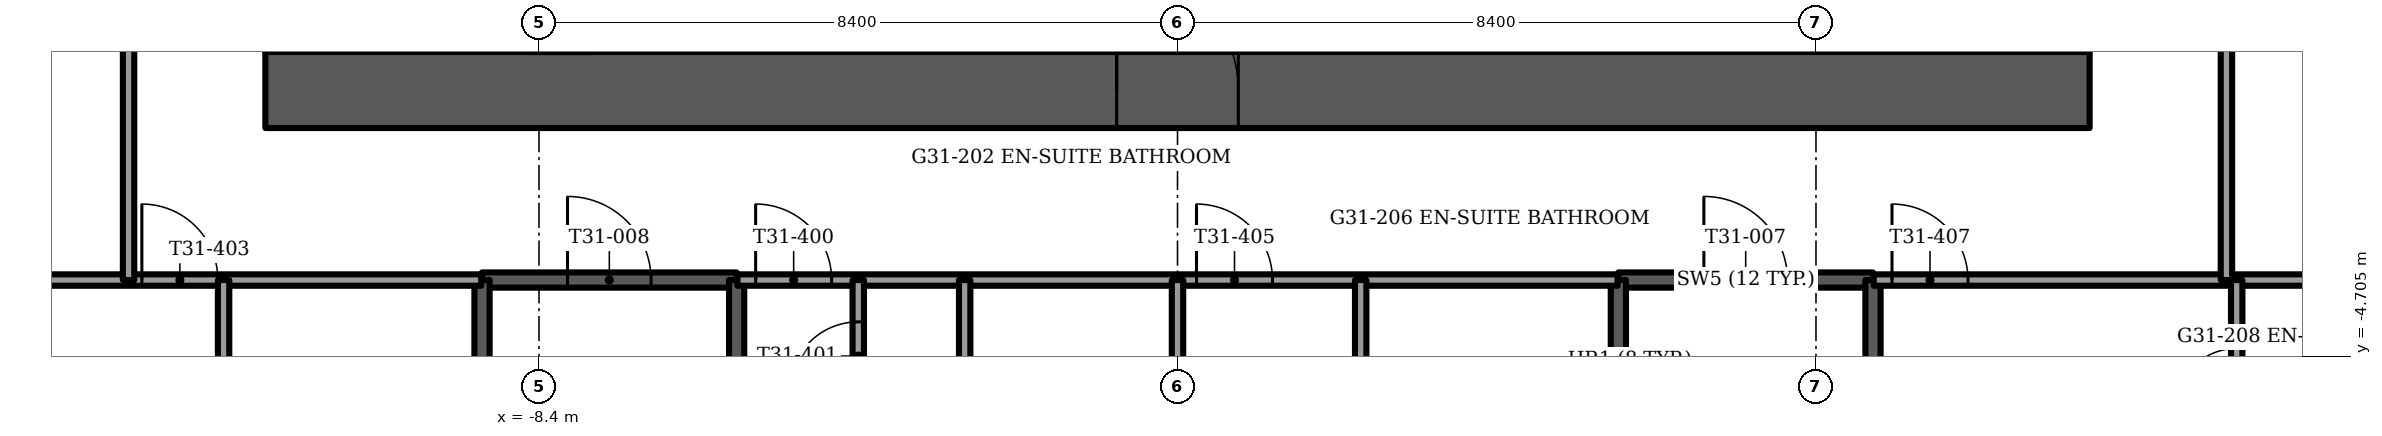
"""IFC4 building model, lengths in metres.
Left out: names, types, materials, properties, quantities, classifications, styles, units other than length and angle.
Written with IfcOpenShell. Run it as: python <this file> out.ifc"""

import sys

from ifc_helpers import new_model, si_unit, direction, frame, frame_2d, origin, place, context, subcontext, project, spatial, rectangle, extrude, element, fill, save


model = new_model("IFC4")
c1 = context("Model", 3, precision=1e-05, world=origin(), true_north=direction((0.0, 1.0)))
c2 = subcontext(c1, "Body", "Model", "MODEL_VIEW")
j1 = project(units=[si_unit("LENGTHUNIT", "METRE"), si_unit("PLANEANGLEUNIT", "RADIAN")], contexts=[c1])
p1 = place(None, origin())
s1 = spatial("IfcSite", under=j1, at=p1, CompositionType="ELEMENT")
p2 = place(p1, origin())
s2 = spatial("IfcBuilding", under=s1, at=p2, CompositionType="ELEMENT")
p3 = place(p2, frame((0.0, 0.0, 127.25)))
s3 = spatial("IfcBuildingStorey", under=s2, at=p3, CompositionType="ELEMENT", Elevation=127.25)
p4 = place(p3, frame((-12.0, -1.2, -0.3), z_axis=(0.0, 0.0, 1.0), x_axis=(1.0, 0.0, 0.0)))
e1 = element("IfcWall", 1, at=p4, inside=s3, PredefinedType="SHEAR", context=c2, shape_type="SweptSolid", body=[
    extrude(rectangle(XDim=24.0, YDim=1.0, at=frame_2d((12.0, 0.0))), origin(), (0.0, 0.0, 1.0), 3.75),
])
p5 = place(p4, frame((11.2, 0.0, 0.0)))
e2 = element("IfcOpeningElement", 2, at=p5, cuts=e1, PredefinedType="OPENING", context=c2, shape_type="SweptSolid", body=[
    extrude(rectangle(XDim=1.6, YDim=2.1, at=frame_2d((0.8, 1.05))), frame((0.0, 0.5, 0.0), z_axis=(0.0, -1.0, 0.0), x_axis=(1.0, 0.0, 0.0)), (0.0, 0.0, 1.0), 1.0),
])
p6 = place(p3, frame((-18.71, -1.444, 0.0), z_axis=(0.0, 0.0, 1.0), x_axis=(0.500010582961, -0.866019293623, 0.0)))
e3 = element("IfcWall", 3, at=p6, inside=s3, PredefinedType="SOLIDWALL", context=c2, shape_type="SweptSolid", body=[
    extrude(rectangle(XDim=16.21, YDim=0.15, at=frame_2d((8.105, 0.0))), origin(), (0.0, 0.0, 1.0), 3.45),
])
p7 = place(p6, frame((2.93, 0.0, 0.15)))
e4 = element("IfcOpeningElement", 4, at=p7, cuts=e3, PredefinedType="OPENING", context=c2, shape_type="SweptSolid", body=[
    extrude(rectangle(XDim=0.9, YDim=2.85, at=frame_2d((0.45, 1.425))), frame((0.0, 0.075, 0.0), z_axis=(0.0, -1.0, 0.0), x_axis=(1.0, 0.0, 0.0)), (0.0, 0.0, 1.0), 0.15),
])
p8 = place(p6, frame((4.205, 0.0, 0.0)))
e5 = element("IfcOpeningElement", 5, at=p8, cuts=e3, PredefinedType="OPENING", context=c2, shape_type="SweptSolid", body=[
    extrude(rectangle(XDim=1.5, YDim=2.4, at=frame_2d((0.75, 1.2))), frame((0.0, 0.075, 0.0), z_axis=(0.0, -1.0, 0.0), x_axis=(1.0, 0.0, 0.0)), (0.0, 0.0, 1.0), 0.15),
])
p9 = place(p6, frame((6.305, 0.0, 0.15)))
e6 = element("IfcOpeningElement", 6, at=p9, cuts=e3, PredefinedType="OPENING", context=c2, shape_type="SweptSolid", body=[
    extrude(rectangle(XDim=1.7, YDim=2.85, at=frame_2d((0.85, 1.425))), frame((0.0, 0.075, 0.0), z_axis=(0.0, -1.0, 0.0), x_axis=(1.0, 0.0, 0.0)), (0.0, 0.0, 1.0), 0.15),
])
p10 = place(p6, frame((8.405, 0.0, 0.0)))
e7 = element("IfcOpeningElement", 7, at=p10, cuts=e3, PredefinedType="OPENING", context=c2, shape_type="SweptSolid", body=[
    extrude(rectangle(XDim=1.5, YDim=2.4, at=frame_2d((0.75, 1.2))), frame((0.0, 0.075, 0.0), z_axis=(0.0, -1.0, 0.0), x_axis=(1.0, 0.0, 0.0)), (0.0, 0.0, 1.0), 0.15),
])
p11 = place(p6, frame((10.505, 0.0, 0.15)))
e8 = element("IfcOpeningElement", 8, at=p11, cuts=e3, PredefinedType="OPENING", context=c2, shape_type="SweptSolid", body=[
    extrude(rectangle(XDim=1.7, YDim=2.85, at=frame_2d((0.85, 1.425))), frame((0.0, 0.075, 0.0), z_axis=(0.0, -1.0, 0.0), x_axis=(1.0, 0.0, 0.0)), (0.0, 0.0, 1.0), 0.15),
])
p12 = place(p6, frame((12.605, 0.0, 0.0)))
e9 = element("IfcOpeningElement", 9, at=p12, cuts=e3, PredefinedType="OPENING", context=c2, shape_type="SweptSolid", body=[
    extrude(rectangle(XDim=1.5, YDim=2.4, at=frame_2d((0.75, 1.2))), frame((0.0, 0.075, 0.0), z_axis=(0.0, -1.0, 0.0), x_axis=(1.0, 0.0, 0.0)), (0.0, 0.0, 1.0), 0.15),
])
p13 = place(p6, frame((0.402, 0.0, 0.15)))
e10 = element("IfcOpeningElement", 10, at=p13, cuts=e3, PredefinedType="OPENING", context=c2, shape_type="SweptSolid", body=[
    extrude(rectangle(XDim=0.9, YDim=2.73, at=frame_2d((0.45, 1.365))), frame((0.0, 0.075, 0.0), z_axis=(0.0, -1.0, 0.0), x_axis=(1.0, 0.0, 0.0)), (0.0, 0.0, 1.0), 0.15),
])
p14 = place(p6, frame((14.907, 0.0, 0.15)))
e11 = element("IfcOpeningElement", 11, at=p14, cuts=e3, PredefinedType="OPENING", context=c2, shape_type="SweptSolid", body=[
    extrude(rectangle(XDim=0.9, YDim=2.73, at=frame_2d((0.45, 1.365))), frame((0.0, 0.075, 0.0), z_axis=(0.0, -1.0, 0.0), x_axis=(1.0, 0.0, 0.0)), (0.0, 0.0, 1.0), 0.15),
])
p15 = place(p3, frame((10.605, -15.481, 0.0), z_axis=(0.0, 0.0, 1.0), x_axis=(0.500010582961, 0.866019293623, 0.0)))
e12 = element("IfcWall", 12, at=p15, inside=s3, PredefinedType="SOLIDWALL", context=c2, shape_type="SweptSolid", body=[
    extrude(rectangle(XDim=16.21, YDim=0.15, at=frame_2d((8.105, 0.0))), origin(), (0.0, 0.0, 1.0), 3.45),
])
p16 = place(p15, frame((2.105, 0.0, 0.15)))
e13 = element("IfcOpeningElement", 13, at=p16, cuts=e12, PredefinedType="OPENING", context=c2, shape_type="SweptSolid", body=[
    extrude(rectangle(XDim=1.7, YDim=2.85, at=frame_2d((0.85, 1.425))), frame((0.0, 0.075, 0.0), z_axis=(0.0, -1.0, 0.0), x_axis=(1.0, 0.0, 0.0)), (0.0, 0.0, 1.0), 0.15),
])
p17 = place(p15, frame((4.205, 0.0, 0.0)))
e14 = element("IfcOpeningElement", 14, at=p17, cuts=e12, PredefinedType="OPENING", context=c2, shape_type="SweptSolid", body=[
    extrude(rectangle(XDim=1.5, YDim=2.4, at=frame_2d((0.75, 1.2))), frame((0.0, 0.075, 0.0), z_axis=(0.0, -1.0, 0.0), x_axis=(1.0, 0.0, 0.0)), (0.0, 0.0, 1.0), 0.15),
])
p18 = place(p15, frame((6.305, 0.0, 0.15)))
e15 = element("IfcOpeningElement", 15, at=p18, cuts=e12, PredefinedType="OPENING", context=c2, shape_type="SweptSolid", body=[
    extrude(rectangle(XDim=1.7, YDim=2.85, at=frame_2d((0.85, 1.425))), frame((0.0, 0.075, 0.0), z_axis=(0.0, -1.0, 0.0), x_axis=(1.0, 0.0, 0.0)), (0.0, 0.0, 1.0), 0.15),
])
p19 = place(p15, frame((8.228, 0.0, 0.0)))
e16 = element("IfcOpeningElement", 16, at=p19, cuts=e12, PredefinedType="OPENING", context=c2, shape_type="SweptSolid", body=[
    extrude(rectangle(XDim=1.5, YDim=2.4, at=frame_2d((0.75, 1.2))), frame((0.0, 0.075, 0.0), z_axis=(0.0, -1.0, 0.0), x_axis=(1.0, 0.0, 0.0)), (0.0, 0.0, 1.0), 0.15),
])
p20 = place(p15, frame((11.78, 0.0, 0.15)))
e17 = element("IfcOpeningElement", 17, at=p20, cuts=e12, PredefinedType="OPENING", context=c2, shape_type="SweptSolid", body=[
    extrude(rectangle(XDim=1.5, YDim=2.85, at=frame_2d((0.75, 1.425))), frame((0.0, 0.075, 0.0), z_axis=(0.0, -1.0, 0.0), x_axis=(1.0, 0.0, 0.0)), (0.0, 0.0, 1.0), 0.15),
])
p21 = place(p15, frame((0.402, 0.0, 0.15)))
e18 = element("IfcOpeningElement", 18, at=p21, cuts=e12, PredefinedType="OPENING", context=c2, shape_type="SweptSolid", body=[
    extrude(rectangle(XDim=0.9, YDim=2.73, at=frame_2d((0.45, 1.365))), frame((0.0, 0.075, 0.0), z_axis=(0.0, -1.0, 0.0), x_axis=(1.0, 0.0, 0.0)), (0.0, 0.0, 1.0), 0.15),
])
p22 = place(p15, frame((14.907, 0.0, 0.15)))
e19 = element("IfcOpeningElement", 19, at=p22, cuts=e12, PredefinedType="OPENING", context=c2, shape_type="SweptSolid", body=[
    extrude(rectangle(XDim=0.9, YDim=2.73, at=frame_2d((0.45, 1.365))), frame((0.0, 0.075, 0.0), z_axis=(0.0, -1.0, 0.0), x_axis=(1.0, 0.0, 0.0)), (0.0, 0.0, 1.0), 0.15),
])
for number, where, z_axis, x_axis in (
    (20, (-5.75, -0.7, 0.0), (0.0, 0.0, 1.0), (0.0, 1.0, 0.0)),
    (21, (5.75, -0.7, 0.0), (0.0, 0.0, 1.0), (0.0, 1.0, 0.0)),
):
    element("IfcWall", number, at=place(p3, frame(where, z_axis=z_axis, x_axis=x_axis)), inside=s3, PredefinedType="PARTITIONING", context=c2, shape_type="SweptSolid", body=[
        extrude(rectangle(XDim=1.6, YDim=0.15, at=frame_2d((0.8, 0.0))), origin(), (0.0, 0.0, 1.0), 3.45),
    ])
p23 = place(p3, frame((5.8, -3.7, -0.3), z_axis=(0.0, 0.0, 1.0), x_axis=(1.0, 0.0, 0.0)))
e22 = element("IfcWall", 22, at=p23, inside=s3, PredefinedType="SOLIDWALL", context=c2, shape_type="SweptSolid", body=[
    extrude(rectangle(XDim=3.35, YDim=0.2, at=frame_2d((1.675, 0.0))), origin(), (0.0, 0.0, 1.0), 3.75),
])
p24 = place(p23, frame((1.125, 0.0, 0.0)))
e23 = element("IfcOpeningElement", 23, at=p24, cuts=e22, PredefinedType="OPENING", context=c2, shape_type="SweptSolid", body=[
    extrude(rectangle(XDim=1.1, YDim=2.1, at=frame_2d((0.55, 1.05))), frame((0.0, 0.1, 0.0), z_axis=(0.0, -1.0, 0.0), x_axis=(1.0, 0.0, 0.0)), (0.0, 0.0, 1.0), 0.2),
])
for number, where, z_axis, x_axis in (
    (24, (5.8, -3.7, -0.3), (0.0, 0.0, 1.0), (0.0, -1.0, 0.0)),
    (25, (9.15, -3.7, -0.3), (0.0, 0.0, 1.0), (0.0, -1.0, 0.0)),
):
    element("IfcWall", number, at=place(p3, frame(where, z_axis=z_axis, x_axis=x_axis)), inside=s3, PredefinedType="SOLIDWALL", context=c2, shape_type="SweptSolid", body=[
        extrude(rectangle(XDim=7.7, YDim=0.2, at=frame_2d((3.85, 0.0))), origin(), (0.0, 0.0, 1.0), 3.75),
    ])
p25 = place(p3, frame((-9.15, -3.7, -0.3), z_axis=(0.0, 0.0, 1.0), x_axis=(1.0, 0.0, 0.0)))
e26 = element("IfcWall", 26, at=p25, inside=s3, PredefinedType="SOLIDWALL", context=c2, shape_type="SweptSolid", body=[
    extrude(rectangle(XDim=3.35, YDim=0.2, at=frame_2d((1.675, 0.0))), origin(), (0.0, 0.0, 1.0), 3.75),
])
p26 = place(p25, frame((1.125, 0.0, 0.0)))
e27 = element("IfcOpeningElement", 27, at=p26, cuts=e26, PredefinedType="OPENING", context=c2, shape_type="SweptSolid", body=[
    extrude(rectangle(XDim=1.1, YDim=2.1, at=frame_2d((0.55, 1.05))), frame((0.0, 0.1, 0.0), z_axis=(0.0, -1.0, 0.0), x_axis=(1.0, 0.0, 0.0)), (0.0, 0.0, 1.0), 0.2),
])
for number, where, z_axis, x_axis in (
    (28, (-9.15, -3.7, -0.3), (0.0, 0.0, 1.0), (0.0, -1.0, 0.0)),
    (29, (-5.8, -3.7, -0.3), (0.0, 0.0, 1.0), (0.0, -1.0, 0.0)),
):
    element("IfcWall", number, at=place(p3, frame(where, z_axis=z_axis, x_axis=x_axis)), inside=s3, PredefinedType="SOLIDWALL", context=c2, shape_type="SweptSolid", body=[
        extrude(rectangle(XDim=7.7, YDim=0.2, at=frame_2d((3.85, 0.0))), origin(), (0.0, 0.0, 1.0), 3.75),
    ])
p27 = place(p3, frame((-17.459, -3.7, 0.0), z_axis=(0.0, 0.0, 1.0), x_axis=(1.0, 0.0, 0.0)))
e30 = element("IfcWall", 30, at=p27, inside=s3, PredefinedType="PARTITIONING", context=c2, shape_type="SweptSolid", body=[
    extrude(rectangle(XDim=8.299, YDim=0.15, at=frame_2d((4.149, 0.0))), origin(), (0.0, 0.0, 1.0), 3.45),
])
p28 = place(p27, frame((3.834, 0.0, 0.0)))
e31 = element("IfcOpeningElement", 31, at=p28, cuts=e30, PredefinedType="OPENING", context=c2, shape_type="SweptSolid", body=[
    extrude(rectangle(XDim=1.0, YDim=2.1, at=frame_2d((0.5, 1.05))), frame((0.0, 0.075, 0.0), z_axis=(0.0, -1.0, 0.0), x_axis=(1.0, 0.0, 0.0)), (0.0, 0.0, 1.0), 0.15),
])
p29 = place(p3, frame((-5.79, -3.7, 0.0), z_axis=(0.0, 0.0, 1.0), x_axis=(1.0, 0.0, 0.0)))
e32 = element("IfcWall", 32, at=p29, inside=s3, PredefinedType="PARTITIONING", context=c2, shape_type="SweptSolid", body=[
    extrude(rectangle(XDim=11.58, YDim=0.15, at=frame_2d((5.79, 0.0))), origin(), (0.0, 0.0, 1.0), 3.45),
])
p30 = place(p29, frame((0.24, 0.0, 0.0)))
e33 = element("IfcOpeningElement", 33, at=p30, cuts=e32, PredefinedType="OPENING", context=c2, shape_type="SweptSolid", body=[
    extrude(rectangle(XDim=1.0, YDim=2.1, at=frame_2d((0.5, 1.05))), frame((0.0, 0.075, 0.0), z_axis=(0.0, -1.0, 0.0), x_axis=(1.0, 0.0, 0.0)), (0.0, 0.0, 1.0), 0.15),
])
p31 = place(p29, frame((6.04, 0.0, 0.0)))
e34 = element("IfcOpeningElement", 34, at=p31, cuts=e32, PredefinedType="OPENING", context=c2, shape_type="SweptSolid", body=[
    extrude(rectangle(XDim=1.0, YDim=2.1, at=frame_2d((0.5, 1.05))), frame((0.0, 0.075, 0.0), z_axis=(0.0, -1.0, 0.0), x_axis=(1.0, 0.0, 0.0)), (0.0, 0.0, 1.0), 0.15),
])
p32 = place(p3, frame((9.16, -3.7, 0.0), z_axis=(0.0, 0.0, 1.0), x_axis=(1.0, 0.0, 0.0)))
e35 = element("IfcWall", 35, at=p32, inside=s3, PredefinedType="PARTITIONING", context=c2, shape_type="SweptSolid", body=[
    extrude(rectangle(XDim=8.299, YDim=0.15, at=frame_2d((4.149, 0.0))), origin(), (0.0, 0.0, 1.0), 3.45),
])
p33 = place(p32, frame((0.24, 0.0, 0.0)))
e36 = element("IfcOpeningElement", 36, at=p33, cuts=e35, PredefinedType="OPENING", context=c2, shape_type="SweptSolid", body=[
    extrude(rectangle(XDim=1.0, YDim=2.1, at=frame_2d((0.5, 1.05))), frame((0.0, 0.075, 0.0), z_axis=(0.0, -1.0, 0.0), x_axis=(1.0, 0.0, 0.0)), (0.0, 0.0, 1.0), 0.15),
])
p34 = place(p3, frame((13.935, -6.3, 0.0), z_axis=(0.0, 0.0, 1.0), x_axis=(0.0, 1.0, 0.0)))
e37 = element("IfcWall", 37, at=p34, inside=s3, PredefinedType="PARTITIONING", context=c2, shape_type="SweptSolid", body=[
    extrude(rectangle(XDim=2.6, YDim=0.15, at=frame_2d((1.3, 0.0))), origin(), (0.0, 0.0, 1.0), 3.45),
])
p35 = place(p34, frame((0.9, 0.0, 0.0)))
e38 = element("IfcOpeningElement", 38, at=p35, cuts=e37, PredefinedType="OPENING", context=c2, shape_type="SweptSolid", body=[
    extrude(rectangle(XDim=0.8, YDim=2.1, at=frame_2d((0.4, 1.05))), frame((0.0, 0.075, 0.0), z_axis=(0.0, -1.0, 0.0), x_axis=(1.0, 0.0, 0.0)), (0.0, 0.0, 1.0), 0.15),
])
p36 = place(p3, frame((13.8, -3.7, 0.0), z_axis=(0.0, 0.0, 1.0), x_axis=(0.0, 1.0, 0.0)))
e39 = element("IfcWall", 39, at=p36, inside=s3, PredefinedType="PARTITIONING", context=c2, shape_type="SweptSolid", body=[
    extrude(rectangle(XDim=11.916, YDim=0.15, at=frame_2d((5.958, 0.0))), origin(), (0.0, 0.0, 1.0), 3.45),
])
p37 = place(p36, frame((4.104, 0.0, 0.0)))
e40 = element("IfcOpeningElement", 40, at=p37, cuts=e39, PredefinedType="OPENING", context=c2, shape_type="SweptSolid", body=[
    extrude(rectangle(XDim=1.0, YDim=2.1, at=frame_2d((0.5, 1.05))), frame((0.0, 0.075, 0.0), z_axis=(0.0, -1.0, 0.0), x_axis=(1.0, 0.0, 0.0)), (0.0, 0.0, 1.0), 0.15),
])
p38 = place(p36, frame((9.538, 0.0, 0.0)))
e41 = element("IfcOpeningElement", 41, at=p38, cuts=e39, PredefinedType="OPENING", context=c2, shape_type="SweptSolid", body=[
    extrude(rectangle(XDim=1.0, YDim=2.1, at=frame_2d((0.5, 1.05))), frame((0.0, 0.075, 0.0), z_axis=(0.0, -1.0, 0.0), x_axis=(1.0, 0.0, 0.0)), (0.0, 0.0, 1.0), 0.15),
])
p39 = place(p3, frame((2.41, -7.3, 0.0), z_axis=(0.0, 0.0, 1.0), x_axis=(0.0, 1.0, 0.0)))
e42 = element("IfcWall", 42, at=p39, inside=s3, PredefinedType="PARTITIONING", context=c2, shape_type="SweptSolid", body=[
    extrude(rectangle(XDim=3.6, YDim=0.15, at=frame_2d((1.8, 0.0))), origin(), (0.0, 0.0, 1.0), 3.45),
])
p40 = place(p39, frame((1.4, 0.0, 0.0)))
e43 = element("IfcOpeningElement", 43, at=p40, cuts=e42, PredefinedType="OPENING", context=c2, shape_type="SweptSolid", body=[
    extrude(rectangle(XDim=0.8, YDim=2.1, at=frame_2d((0.4, 1.05))), frame((0.0, 0.075, 0.0), z_axis=(0.0, -1.0, 0.0), x_axis=(1.0, 0.0, 0.0)), (0.0, 0.0, 1.0), 0.15),
])
p41 = place(p3, frame((0.0, -16.059, 0.0), z_axis=(0.0, 0.0, 1.0), x_axis=(0.0, 1.0, 0.0)))
e44 = element("IfcWall", 44, at=p41, inside=s3, PredefinedType="PARTITIONING", context=c2, shape_type="SweptSolid", body=[
    extrude(rectangle(XDim=12.359, YDim=0.15, at=frame_2d((6.18, 0.0))), origin(), (0.0, 0.0, 1.0), 3.45),
])
p42 = place(p3, frame((-2.8, -7.3, 0.0), z_axis=(0.0, 0.0, 1.0), x_axis=(0.0, 1.0, 0.0)))
e45 = element("IfcWall", 45, at=p42, inside=s3, PredefinedType="PARTITIONING", context=c2, shape_type="SweptSolid", body=[
    extrude(rectangle(XDim=3.6, YDim=0.15, at=frame_2d((1.8, 0.0))), origin(), (0.0, 0.0, 1.0), 3.45),
])
p43 = place(p42, frame((1.4, 0.0, 0.0)))
e46 = element("IfcOpeningElement", 46, at=p43, cuts=e45, PredefinedType="OPENING", context=c2, shape_type="SweptSolid", body=[
    extrude(rectangle(XDim=0.8, YDim=2.1, at=frame_2d((0.4, 1.05))), frame((0.0, 0.075, 0.0), z_axis=(0.0, -1.0, 0.0), x_axis=(1.0, 0.0, 0.0)), (0.0, 0.0, 1.0), 0.15),
])
p44 = place(p3, frame((-4.2, -16.059, 0.0), z_axis=(0.0, 0.0, 1.0), x_axis=(0.0, 1.0, 0.0)))
e47 = element("IfcWall", 47, at=p44, inside=s3, PredefinedType="PARTITIONING", context=c2, shape_type="SweptSolid", body=[
    extrude(rectangle(XDim=12.359, YDim=0.15, at=frame_2d((6.18, 0.0))), origin(), (0.0, 0.0, 1.0), 3.45),
])
p45 = place(p44, frame((10.909, 0.0, 0.0)))
e48 = element("IfcOpeningElement", 48, at=p45, cuts=e47, PredefinedType="OPENING", context=c2, shape_type="SweptSolid", body=[
    extrude(rectangle(XDim=0.9, YDim=2.1, at=frame_2d((0.45, 1.05))), frame((0.0, 0.075, 0.0), z_axis=(0.0, -1.0, 0.0), x_axis=(1.0, 0.0, 0.0)), (0.0, 0.0, 1.0), 0.15),
])
p46 = place(p3, frame((-12.55, -7.3, 0.0), z_axis=(0.0, 0.0, 1.0), x_axis=(0.0, 1.0, 0.0)))
e49 = element("IfcWall", 49, at=p46, inside=s3, PredefinedType="PARTITIONING", context=c2, shape_type="SweptSolid", body=[
    extrude(rectangle(XDim=3.6, YDim=0.15, at=frame_2d((1.8, 0.0))), origin(), (0.0, 0.0, 1.0), 3.45),
])
p47 = place(p46, frame((1.4, 0.0, 0.0)))
e50 = element("IfcOpeningElement", 50, at=p47, cuts=e49, PredefinedType="OPENING", context=c2, shape_type="SweptSolid", body=[
    extrude(rectangle(XDim=0.8, YDim=2.1, at=frame_2d((0.4, 1.05))), frame((0.0, 0.075, 0.0), z_axis=(0.0, -1.0, 0.0), x_axis=(1.0, 0.0, 0.0)), (0.0, 0.0, 1.0), 0.15),
])
p48 = place(p3, frame((-13.8, -3.7, 0.0), z_axis=(0.0, 0.0, 1.0), x_axis=(0.0, 1.0, 0.0)))
e51 = element("IfcWall", 51, at=p48, inside=s3, PredefinedType="PARTITIONING", context=c2, shape_type="SweptSolid", body=[
    extrude(rectangle(XDim=11.916, YDim=0.15, at=frame_2d((5.958, 0.0))), origin(), (0.0, 0.0, 1.0), 3.45),
])
p49 = place(p48, frame((4.227, 0.0, 0.0)))
e52 = element("IfcOpeningElement", 52, at=p49, cuts=e51, PredefinedType="OPENING", context=c2, shape_type="SweptSolid", body=[
    extrude(rectangle(XDim=1.0, YDim=2.1, at=frame_2d((0.5, 1.05))), frame((0.0, 0.075, 0.0), z_axis=(0.0, -1.0, 0.0), x_axis=(1.0, 0.0, 0.0)), (0.0, 0.0, 1.0), 0.15),
])
p50 = place(p48, frame((9.538, 0.0, 0.0)))
e53 = element("IfcOpeningElement", 53, at=p50, cuts=e51, PredefinedType="OPENING", context=c2, shape_type="SweptSolid", body=[
    extrude(rectangle(XDim=1.0, YDim=2.1, at=frame_2d((0.5, 1.05))), frame((0.0, 0.075, 0.0), z_axis=(0.0, -1.0, 0.0), x_axis=(1.0, 0.0, 0.0)), (0.0, 0.0, 1.0), 0.15),
])
p51 = place(p5, origin())
e54 = element("IfcDoor", 54, at=p51, inside=s3, OperationType="DOUBLE_DOOR_SINGLE_SWING", PredefinedType="DOOR", context=c2, shape_type="SweptSolid", body=[
    extrude(rectangle(XDim=1.6, YDim=2.1, at=frame_2d((0.8, 1.05))), frame((0.0, 0.025, 0.0), z_axis=(0.0, -1.0, 0.0), x_axis=(1.0, 0.0, 0.0)), (0.0, 0.0, 1.0), 0.05),
])
fill(e2, e54)
p52 = place(p24, origin())
e55 = element("IfcDoor", 55, at=p52, inside=s3, OperationType="SINGLE_SWING_LEFT", PredefinedType="DOOR", context=c2, shape_type="SweptSolid", body=[
    extrude(rectangle(XDim=1.1, YDim=2.1, at=frame_2d((0.55, 1.05))), frame((0.0, 0.025, 0.0), z_axis=(0.0, -1.0, 0.0), x_axis=(1.0, 0.0, 0.0)), (0.0, 0.0, 1.0), 0.05),
])
fill(e23, e55)
p53 = place(p26, origin())
e56 = element("IfcDoor", 56, at=p53, inside=s3, OperationType="SINGLE_SWING_LEFT", PredefinedType="DOOR", context=c2, shape_type="SweptSolid", body=[
    extrude(rectangle(XDim=1.1, YDim=2.1, at=frame_2d((0.55, 1.05))), frame((0.0, 0.025, 0.0), z_axis=(0.0, -1.0, 0.0), x_axis=(1.0, 0.0, 0.0)), (0.0, 0.0, 1.0), 0.05),
])
fill(e27, e56)
p54 = place(p30, origin())
e57 = element("IfcDoor", 57, at=p54, inside=s3, OperationType="SINGLE_SWING_LEFT", PredefinedType="DOOR", context=c2, shape_type="SweptSolid", body=[
    extrude(rectangle(XDim=1.0, YDim=2.1, at=frame_2d((0.5, 1.05))), frame((0.0, 0.025, 0.0), z_axis=(0.0, -1.0, 0.0), x_axis=(1.0, 0.0, 0.0)), (0.0, 0.0, 1.0), 0.05),
])
fill(e33, e57)
p55 = place(p45, origin())
e58 = element("IfcDoor", 58, at=p55, inside=s3, OperationType="SINGLE_SWING_RIGHT", PredefinedType="DOOR", context=c2, shape_type="SweptSolid", body=[
    extrude(rectangle(XDim=0.9, YDim=2.1, at=frame_2d((0.45, 1.05))), frame((0.0, 0.025, 0.0), z_axis=(0.0, -1.0, 0.0), x_axis=(1.0, 0.0, 0.0)), (0.0, 0.0, 1.0), 0.05),
])
fill(e48, e58)
p56 = place(p28, origin())
e59 = element("IfcDoor", 59, at=p56, inside=s3, OperationType="SINGLE_SWING_LEFT", PredefinedType="DOOR", context=c2, shape_type="SweptSolid", body=[
    extrude(rectangle(XDim=1.0, YDim=2.1, at=frame_2d((0.5, 1.05))), frame((0.0, 0.025, 0.0), z_axis=(0.0, -1.0, 0.0), x_axis=(1.0, 0.0, 0.0)), (0.0, 0.0, 1.0), 0.05),
])
fill(e31, e59)
p57 = place(p31, origin())
e60 = element("IfcDoor", 60, at=p57, inside=s3, OperationType="SINGLE_SWING_LEFT", PredefinedType="DOOR", context=c2, shape_type="SweptSolid", body=[
    extrude(rectangle(XDim=1.0, YDim=2.1, at=frame_2d((0.5, 1.05))), frame((0.0, 0.025, 0.0), z_axis=(0.0, -1.0, 0.0), x_axis=(1.0, 0.0, 0.0)), (0.0, 0.0, 1.0), 0.05),
])
fill(e34, e60)
p58 = place(p33, origin())
e61 = element("IfcDoor", 61, at=p58, inside=s3, OperationType="SINGLE_SWING_LEFT", PredefinedType="DOOR", context=c2, shape_type="SweptSolid", body=[
    extrude(rectangle(XDim=1.0, YDim=2.1, at=frame_2d((0.5, 1.05))), frame((0.0, 0.025, 0.0), z_axis=(0.0, -1.0, 0.0), x_axis=(1.0, 0.0, 0.0)), (0.0, 0.0, 1.0), 0.05),
])
fill(e36, e61)
p59 = place(p35, origin())
e62 = element("IfcDoor", 62, at=p59, inside=s3, OperationType="SINGLE_SWING_RIGHT", PredefinedType="DOOR", context=c2, shape_type="SweptSolid", body=[
    extrude(rectangle(XDim=0.8, YDim=2.1, at=frame_2d((0.4, 1.05))), frame((0.0, 0.025, 0.0), z_axis=(0.0, -1.0, 0.0), x_axis=(1.0, 0.0, 0.0)), (0.0, 0.0, 1.0), 0.05),
])
fill(e38, e62)
save(model, sys.argv[1])
